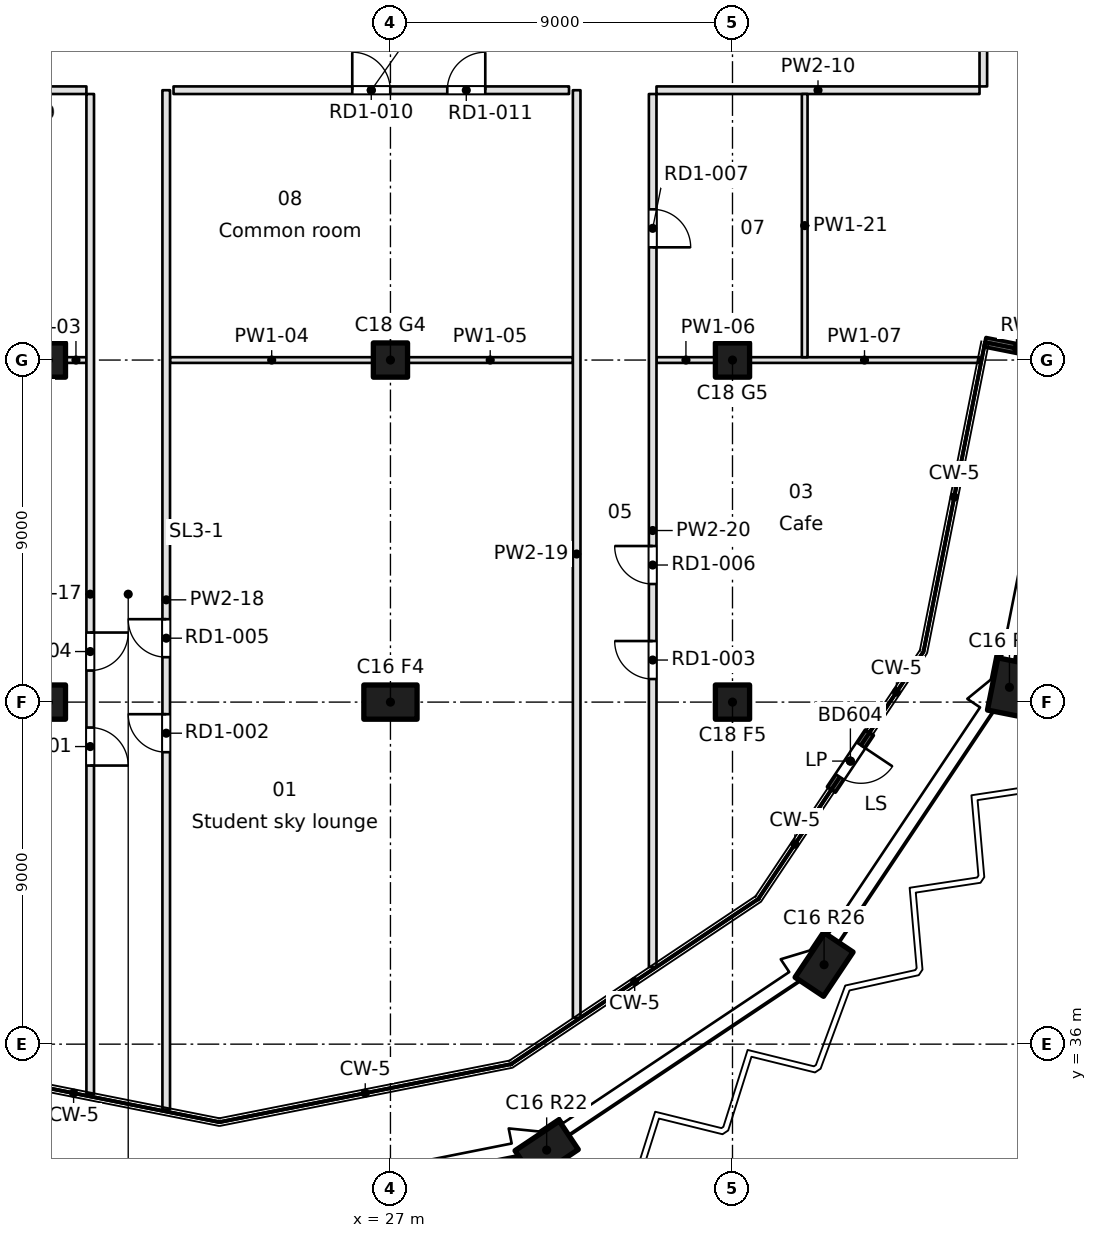
"""IFC4 building model, lengths in metres.
Left out: names, types, materials, properties, quantities, classifications, styles, units other than length and angle.
Written with IfcOpenShell. Run it as: python <this file> out.ifc"""

import sys

from ifc_helpers import new_model, si_unit, direction, frame, frame_2d, origin, origin_2d, place, context, subcontext, project, spatial, rectangle, extrude, element, fill, save


model = new_model("IFC4")
c1 = context("Model", 3, precision=1e-05, world=origin(), true_north=direction((0.0, 1.0)))
c2 = subcontext(c1, "Body", "Model", "MODEL_VIEW")
j1 = project(units=[si_unit("LENGTHUNIT", "METRE"), si_unit("PLANEANGLEUNIT", "RADIAN")], contexts=[c1])
p1 = place(None, origin())
s1 = spatial("IfcSite", under=j1, at=p1, CompositionType="ELEMENT")
p2 = place(p1, origin())
s2 = spatial("IfcBuilding", under=s1, at=p2, CompositionType="ELEMENT")
p3 = place(p2, frame((0.0, 0.0, 291.9)))
s3 = spatial("IfcBuildingStorey", under=s2, at=p3, CompositionType="ELEMENT", Elevation=291.9)
for number, where, z_axis, x_axis in (
    (1, (31.11, 33.213, 0.0), (0.0, 0.0, 1.0), (0.831, 0.556, 0.0)),
    (2, (38.41, 38.09, 0.0), (0.0, 0.0, 1.0), (0.556, 0.831, 0.0)),
    (3, (43.287, 45.39, 0.0), (0.0, 0.0, 1.0), (0.195, 0.981, 0.0)),
):
    element("IfcColumn", number, at=place(p3, frame(where, z_axis=z_axis, x_axis=x_axis)), inside=s3, PredefinedType="COLUMN", context=c2, shape_type="SweptSolid", body=[
        extrude(rectangle(XDim=1.4, YDim=0.9, at=origin_2d()), origin(), (0.0, 0.0, 1.0), 3.7),
    ])
for number, where, z_axis, x_axis in (
    (4, (18.0, 45.0, 0.0), (0.0, 0.0, 1.0), (1.0, 0.0, 0.0)),
    (5, (18.0, 54.0, 0.0), (0.0, 0.0, 1.0), (1.0, 0.0, 0.0)),
):
    element("IfcColumn", number, at=place(p3, frame(where, z_axis=z_axis, x_axis=x_axis)), inside=s3, PredefinedType="COLUMN", context=c2, shape_type="SweptSolid", body=[
        extrude(rectangle(XDim=0.9, YDim=0.9, at=origin_2d()), origin(), (0.0, 0.0, 1.0), 3.7),
    ])
p4 = place(p3, frame((27.0, 45.0, 0.0), z_axis=(0.0, 0.0, 1.0), x_axis=(1.0, 0.0, 0.0)))
e6 = element("IfcColumn", 6, at=p4, inside=s3, PredefinedType="COLUMN", context=c2, shape_type="SweptSolid", body=[
    extrude(rectangle(XDim=1.4, YDim=0.9, at=origin_2d()), origin(), (0.0, 0.0, 1.0), 3.7),
])
for number, where, z_axis, x_axis in (
    (7, (27.0, 54.0, 0.0), (0.0, 0.0, 1.0), (1.0, 0.0, 0.0)),
    (8, (36.0, 45.0, 0.0), (0.0, 0.0, 1.0), (1.0, 0.0, 0.0)),
    (9, (36.0, 54.0, 0.0), (0.0, 0.0, 1.0), (1.0, 0.0, 0.0)),
):
    element("IfcColumn", number, at=place(p3, frame(where, z_axis=z_axis, x_axis=x_axis)), inside=s3, PredefinedType="COLUMN", context=c2, shape_type="SweptSolid", body=[
        extrude(rectangle(XDim=0.9, YDim=0.9, at=origin_2d()), origin(), (0.0, 0.0, 1.0), 3.7),
    ])
p5 = place(p3, frame((38.602, 42.7, 0.0), z_axis=(0.0, 0.0, 1.0), x_axis=(0.555576323502, 0.83146554274, 0.0)))
e10 = element("IfcWall", 10, at=p5, inside=s3, PredefinedType="SOLIDWALL", context=c2, shape_type="SweptSolid", body=[
    extrude(rectangle(XDim=1.8, YDim=0.25, at=frame_2d((0.9, 0.0))), origin(), (0.0, 0.0, 1.0), 3.3),
])
p6 = place(p5, frame((0.4, 0.0, 0.0)))
e11 = element("IfcOpeningElement", 11, at=p6, cuts=e10, PredefinedType="OPENING", context=c2, shape_type="SweptSolid", body=[
    extrude(rectangle(XDim=1.0, YDim=2.1, at=frame_2d((0.5, 1.05))), frame((0.0, 0.125, 0.0), z_axis=(0.0, -1.0, 0.0), x_axis=(1.0, 0.0, 0.0)), (0.0, 0.0, 1.0), 0.25),
])
p7 = place(p3, frame((42.645, 54.469, 0.0), z_axis=(0.0, 0.0, 1.0), x_axis=(0.980846923473, -0.194780165092, 0.0)))
e12 = element("IfcWall", 12, at=p7, inside=s3, PredefinedType="SOLIDWALL", context=c2, shape_type="SweptSolid", body=[
    extrude(rectangle(XDim=1.687, YDim=0.25, at=frame_2d((0.844, 0.0))), origin(), (0.0, 0.0, 1.0), 3.3),
])
p8 = place(p3, frame((18.45, 54.0, 0.0), z_axis=(0.0, 0.0, 1.0), x_axis=(1.0, 0.0, 0.0)))
e13 = element("IfcWall", 13, at=p8, inside=s3, PredefinedType="PARTITIONING", context=c2, shape_type="SweptSolid", body=[
    extrude(rectangle(XDim=0.55, YDim=0.15, at=frame_2d((0.275, 0.0))), origin(), (0.0, 0.0, 1.0), 3.3),
])
p9 = place(p3, frame((21.2, 54.0, 0.0), z_axis=(0.0, 0.0, 1.0), x_axis=(1.0, 0.0, 0.0)))
e14 = element("IfcWall", 14, at=p9, inside=s3, PredefinedType="PARTITIONING", context=c2, shape_type="SweptSolid", body=[
    extrude(rectangle(XDim=5.35, YDim=0.15, at=frame_2d((2.675, 0.0))), origin(), (0.0, 0.0, 1.0), 3.3),
])
p10 = place(p3, frame((27.45, 54.0, 0.0), z_axis=(0.0, 0.0, 1.0), x_axis=(1.0, 0.0, 0.0)))
e15 = element("IfcWall", 15, at=p10, inside=s3, PredefinedType="PARTITIONING", context=c2, shape_type="SweptSolid", body=[
    extrude(rectangle(XDim=4.35, YDim=0.15, at=frame_2d((2.175, 0.0))), origin(), (0.0, 0.0, 1.0), 3.3),
])
p11 = place(p3, frame((34.0, 54.0, 0.0), z_axis=(0.0, 0.0, 1.0), x_axis=(1.0, 0.0, 0.0)))
e16 = element("IfcWall", 16, at=p11, inside=s3, PredefinedType="PARTITIONING", context=c2, shape_type="SweptSolid", body=[
    extrude(rectangle(XDim=1.55, YDim=0.15, at=frame_2d((0.775, 0.0))), origin(), (0.0, 0.0, 1.0), 3.3),
])
p12 = place(p3, frame((36.45, 54.0, 0.0), z_axis=(0.0, 0.0, 1.0), x_axis=(1.0, 0.0, 0.0)))
e17 = element("IfcWall", 17, at=p12, inside=s3, PredefinedType="PARTITIONING", context=c2, shape_type="SweptSolid", body=[
    extrude(rectangle(XDim=6.047, YDim=0.15, at=frame_2d((3.023, 0.0))), origin(), (0.0, 0.0, 1.0), 3.3),
])
p13 = place(p3, frame((19.0, 61.1, 0.0), z_axis=(0.0, 0.0, 1.0), x_axis=(-1.0, 0.0, 0.0)))
e18 = element("IfcWall", 18, at=p13, inside=s3, PredefinedType="PARTITIONING", context=c2, shape_type="SweptSolid", body=[
    extrude(rectangle(XDim=10.096, YDim=0.2, at=frame_2d((5.048, 0.0))), origin(), (0.0, 0.0, 1.0), 3.3),
])
p14 = place(p13, frame((4.548, 0.0, 0.0)))
e19 = element("IfcOpeningElement", 19, at=p14, cuts=e18, PredefinedType="OPENING", context=c2, shape_type="SweptSolid", body=[
    extrude(rectangle(XDim=1.0, YDim=2.1, at=frame_2d((0.5, 1.05))), frame((0.0, 0.1, 0.0), z_axis=(0.0, -1.0, 0.0), x_axis=(1.0, 0.0, 0.0)), (0.0, 0.0, 1.0), 0.2),
])
p15 = place(p13, frame((2.048, 0.0, 0.0)))
e20 = element("IfcOpeningElement", 20, at=p15, cuts=e18, PredefinedType="OPENING", context=c2, shape_type="SweptSolid", body=[
    extrude(rectangle(XDim=1.0, YDim=2.1, at=frame_2d((0.5, 1.05))), frame((0.0, 0.1, 0.0), z_axis=(0.0, -1.0, 0.0), x_axis=(1.0, 0.0, 0.0)), (0.0, 0.0, 1.0), 0.2),
])
p16 = place(p3, frame((31.698, 61.1, 0.0), z_axis=(0.0, 0.0, 1.0), x_axis=(-1.0, 0.0, 0.0)))
e21 = element("IfcWall", 21, at=p16, inside=s3, PredefinedType="PARTITIONING", context=c2, shape_type="SweptSolid", body=[
    extrude(rectangle(XDim=10.406, YDim=0.2, at=frame_2d((5.203, 0.0))), origin(), (0.0, 0.0, 1.0), 3.3),
])
p17 = place(p16, frame((4.703, 0.0, 0.0)))
e22 = element("IfcOpeningElement", 22, at=p17, cuts=e21, PredefinedType="OPENING", context=c2, shape_type="SweptSolid", body=[
    extrude(rectangle(XDim=1.0, YDim=2.1, at=frame_2d((0.5, 1.05))), frame((0.0, 0.1, 0.0), z_axis=(0.0, -1.0, 0.0), x_axis=(1.0, 0.0, 0.0)), (0.0, 0.0, 1.0), 0.2),
])
p18 = place(p16, frame((2.203, 0.0, 0.0)))
e23 = element("IfcOpeningElement", 23, at=p18, cuts=e21, PredefinedType="OPENING", context=c2, shape_type="SweptSolid", body=[
    extrude(rectangle(XDim=1.0, YDim=2.1, at=frame_2d((0.5, 1.05))), frame((0.0, 0.1, 0.0), z_axis=(0.0, -1.0, 0.0), x_axis=(1.0, 0.0, 0.0)), (0.0, 0.0, 1.0), 0.2),
])
p19 = place(p3, frame((42.5, 61.1, 0.0), z_axis=(0.0, 0.0, 1.0), x_axis=(-1.0, 0.0, 0.0)))
e24 = element("IfcWall", 24, at=p19, inside=s3, PredefinedType="PARTITIONING", context=c2, shape_type="SweptSolid", body=[
    extrude(rectangle(XDim=8.5, YDim=0.2, at=frame_2d((4.25, 0.0))), origin(), (0.0, 0.0, 1.0), 3.3),
])
p20 = place(p3, frame((19.1, 34.679, 0.0), z_axis=(0.0, 0.0, 1.0), x_axis=(0.0, 1.0, 0.0)))
e25 = element("IfcWall", 25, at=p20, inside=s3, PredefinedType="PARTITIONING", context=c2, shape_type="SweptSolid", body=[
    extrude(rectangle(XDim=26.321, YDim=0.2, at=frame_2d((13.16, 0.0))), origin(), (0.0, 0.0, 1.0), 3.3),
])
p21 = place(p20, frame((8.651, 0.0, 0.0)))
e26 = element("IfcOpeningElement", 26, at=p21, cuts=e25, PredefinedType="OPENING", context=c2, shape_type="SweptSolid", body=[
    extrude(rectangle(XDim=1.0, YDim=2.1, at=frame_2d((0.5, 1.05))), frame((0.0, 0.1, 0.0), z_axis=(0.0, -1.0, 0.0), x_axis=(1.0, 0.0, 0.0)), (0.0, 0.0, 1.0), 0.2),
])
p22 = place(p20, frame((11.151, 0.0, 0.0)))
e27 = element("IfcOpeningElement", 27, at=p22, cuts=e25, PredefinedType="OPENING", context=c2, shape_type="SweptSolid", body=[
    extrude(rectangle(XDim=1.0, YDim=2.1, at=frame_2d((0.5, 1.05))), frame((0.0, 0.1, 0.0), z_axis=(0.0, -1.0, 0.0), x_axis=(1.0, 0.0, 0.0)), (0.0, 0.0, 1.0), 0.2),
])
p23 = place(p3, frame((21.1, 61.1, 0.0), z_axis=(0.0, 0.0, 1.0), x_axis=(0.0, -1.0, 0.0)))
e28 = element("IfcWall", 28, at=p23, inside=s3, PredefinedType="PARTITIONING", context=c2, shape_type="SweptSolid", body=[
    extrude(rectangle(XDim=26.819, YDim=0.2, at=frame_2d((13.409, 0.0))), origin(), (0.0, 0.0, 1.0), 3.3),
])
p24 = place(p23, frame((16.418, 0.0, 0.0)))
e29 = element("IfcOpeningElement", 29, at=p24, cuts=e28, PredefinedType="OPENING", context=c2, shape_type="SweptSolid", body=[
    extrude(rectangle(XDim=1.0, YDim=2.1, at=frame_2d((0.5, 1.05))), frame((0.0, 0.1, 0.0), z_axis=(0.0, -1.0, 0.0), x_axis=(1.0, 0.0, 0.0)), (0.0, 0.0, 1.0), 0.2),
])
p25 = place(p23, frame((13.918, 0.0, 0.0)))
e30 = element("IfcOpeningElement", 30, at=p25, cuts=e28, PredefinedType="OPENING", context=c2, shape_type="SweptSolid", body=[
    extrude(rectangle(XDim=1.0, YDim=2.1, at=frame_2d((0.5, 1.05))), frame((0.0, 0.1, 0.0), z_axis=(0.0, -1.0, 0.0), x_axis=(1.0, 0.0, 0.0)), (0.0, 0.0, 1.0), 0.2),
])
p26 = place(p3, frame((31.9, 36.693, 0.0), z_axis=(0.0, 0.0, 1.0), x_axis=(0.0, 1.0, 0.0)))
e31 = element("IfcWall", 31, at=p26, inside=s3, PredefinedType="PARTITIONING", context=c2, shape_type="SweptSolid", body=[
    extrude(rectangle(XDim=24.407, YDim=0.2, at=frame_2d((12.204, 0.0))), origin(), (0.0, 0.0, 1.0), 3.3),
])
p27 = place(p3, frame((33.9, 61.0, 0.0), z_axis=(0.0, 0.0, 1.0), x_axis=(0.0, -1.0, 0.0)))
e32 = element("IfcWall", 32, at=p27, inside=s3, PredefinedType="PARTITIONING", context=c2, shape_type="SweptSolid", body=[
    extrude(rectangle(XDim=22.971, YDim=0.2, at=frame_2d((11.485, 0.0))), origin(), (0.0, 0.0, 1.0), 3.3),
])
p28 = place(p27, frame((14.393, 0.0, 0.0)))
e33 = element("IfcOpeningElement", 33, at=p28, cuts=e32, PredefinedType="OPENING", context=c2, shape_type="SweptSolid", body=[
    extrude(rectangle(XDim=1.0, YDim=2.1, at=frame_2d((0.5, 1.05))), frame((0.0, 0.1, 0.0), z_axis=(0.0, -1.0, 0.0), x_axis=(1.0, 0.0, 0.0)), (0.0, 0.0, 1.0), 0.2),
])
p29 = place(p27, frame((11.893, 0.0, 0.0)))
e34 = element("IfcOpeningElement", 34, at=p29, cuts=e32, PredefinedType="OPENING", context=c2, shape_type="SweptSolid", body=[
    extrude(rectangle(XDim=1.0, YDim=2.1, at=frame_2d((0.5, 1.05))), frame((0.0, 0.1, 0.0), z_axis=(0.0, -1.0, 0.0), x_axis=(1.0, 0.0, 0.0)), (0.0, 0.0, 1.0), 0.2),
])
p30 = place(p27, frame((3.034, 0.0, 0.0)))
e35 = element("IfcOpeningElement", 35, at=p30, cuts=e32, PredefinedType="OPENING", context=c2, shape_type="SweptSolid", body=[
    extrude(rectangle(XDim=1.0, YDim=2.1, at=frame_2d((0.5, 1.05))), frame((0.0, 0.1, 0.0), z_axis=(0.0, -1.0, 0.0), x_axis=(1.0, 0.0, 0.0)), (0.0, 0.0, 1.0), 0.2),
])
p31 = place(p3, frame((37.9, 61.0, 0.0), z_axis=(0.0, 0.0, 1.0), x_axis=(0.0, -1.0, 0.0)))
e36 = element("IfcWall", 36, at=p31, inside=s3, PredefinedType="PARTITIONING", context=c2, shape_type="SweptSolid", body=[
    extrude(rectangle(XDim=6.925, YDim=0.15, at=frame_2d((3.462, 0.0))), origin(), (0.0, 0.0, 1.0), 3.3),
])
p32 = place(p3, frame((42.6, 63.6, 0.0), z_axis=(0.0, 0.0, 1.0), x_axis=(0.0, -1.0, 0.0)))
e37 = element("IfcWall", 37, at=p32, inside=s3, PredefinedType="PARTITIONING", context=c2, shape_type="SweptSolid", body=[
    extrude(rectangle(XDim=2.4, YDim=0.2, at=frame_2d((1.2, 0.0))), origin(), (0.0, 0.0, 1.0), 3.3),
])
p33 = place(p6, frame((1.0, 0.0, 0.0), z_axis=(0.0, 0.0, 1.0), x_axis=(-1.0, 0.0, 0.0)))
e38 = element("IfcDoor", 38, at=p33, inside=s3, OperationType="SINGLE_SWING_LEFT", PredefinedType="DOOR", context=c2, shape_type="SweptSolid", body=[
    extrude(rectangle(XDim=1.0, YDim=2.1, at=frame_2d((0.5, 1.05))), frame((0.0, 0.025, 0.0), z_axis=(0.0, -1.0, 0.0), x_axis=(1.0, 0.0, 0.0)), (0.0, 0.0, 1.0), 0.05),
])
fill(e11, e38)
p34 = place(p21, frame((1.0, 0.0, 0.0), z_axis=(0.0, 0.0, 1.0), x_axis=(-1.0, 0.0, 0.0)))
e39 = element("IfcDoor", 39, at=p34, inside=s3, OperationType="SINGLE_SWING_RIGHT", PredefinedType="DOOR", context=c2, shape_type="SweptSolid", body=[
    extrude(rectangle(XDim=1.0, YDim=2.1, at=frame_2d((0.5, 1.05))), frame((0.0, 0.025, 0.0), z_axis=(0.0, -1.0, 0.0), x_axis=(1.0, 0.0, 0.0)), (0.0, 0.0, 1.0), 0.05),
])
fill(e26, e39)
p35 = place(p24, frame((1.0, 0.0, 0.0), z_axis=(0.0, 0.0, 1.0), x_axis=(-1.0, 0.0, 0.0)))
e40 = element("IfcDoor", 40, at=p35, inside=s3, OperationType="SINGLE_SWING_RIGHT", PredefinedType="DOOR", context=c2, shape_type="SweptSolid", body=[
    extrude(rectangle(XDim=1.0, YDim=2.1, at=frame_2d((0.5, 1.05))), frame((0.0, 0.025, 0.0), z_axis=(0.0, -1.0, 0.0), x_axis=(1.0, 0.0, 0.0)), (0.0, 0.0, 1.0), 0.05),
])
fill(e29, e40)
p36 = place(p28, frame((1.0, 0.0, 0.0), z_axis=(0.0, 0.0, 1.0), x_axis=(-1.0, 0.0, 0.0)))
e41 = element("IfcDoor", 41, at=p36, inside=s3, OperationType="SINGLE_SWING_RIGHT", PredefinedType="DOOR", context=c2, shape_type="SweptSolid", body=[
    extrude(rectangle(XDim=1.0, YDim=2.1, at=frame_2d((0.5, 1.05))), frame((0.0, 0.025, 0.0), z_axis=(0.0, -1.0, 0.0), x_axis=(1.0, 0.0, 0.0)), (0.0, 0.0, 1.0), 0.05),
])
fill(e33, e41)
p37 = place(p22, frame((1.0, 0.0, 0.0), z_axis=(0.0, 0.0, 1.0), x_axis=(-1.0, 0.0, 0.0)))
e42 = element("IfcDoor", 42, at=p37, inside=s3, OperationType="SINGLE_SWING_LEFT", PredefinedType="DOOR", context=c2, shape_type="SweptSolid", body=[
    extrude(rectangle(XDim=1.0, YDim=2.1, at=frame_2d((0.5, 1.05))), frame((0.0, 0.025, 0.0), z_axis=(0.0, -1.0, 0.0), x_axis=(1.0, 0.0, 0.0)), (0.0, 0.0, 1.0), 0.05),
])
fill(e27, e42)
p38 = place(p25, frame((1.0, 0.0, 0.0), z_axis=(0.0, 0.0, 1.0), x_axis=(-1.0, 0.0, 0.0)))
e43 = element("IfcDoor", 43, at=p38, inside=s3, OperationType="SINGLE_SWING_RIGHT", PredefinedType="DOOR", context=c2, shape_type="SweptSolid", body=[
    extrude(rectangle(XDim=1.0, YDim=2.1, at=frame_2d((0.5, 1.05))), frame((0.0, 0.025, 0.0), z_axis=(0.0, -1.0, 0.0), x_axis=(1.0, 0.0, 0.0)), (0.0, 0.0, 1.0), 0.05),
])
fill(e30, e43)
p39 = place(p29, frame((1.0, 0.0, 0.0), z_axis=(0.0, 0.0, 1.0), x_axis=(-1.0, 0.0, 0.0)))
e44 = element("IfcDoor", 44, at=p39, inside=s3, OperationType="SINGLE_SWING_RIGHT", PredefinedType="DOOR", context=c2, shape_type="SweptSolid", body=[
    extrude(rectangle(XDim=1.0, YDim=2.1, at=frame_2d((0.5, 1.05))), frame((0.0, 0.025, 0.0), z_axis=(0.0, -1.0, 0.0), x_axis=(1.0, 0.0, 0.0)), (0.0, 0.0, 1.0), 0.05),
])
fill(e34, e44)
p40 = place(p30, origin())
e45 = element("IfcDoor", 45, at=p40, inside=s3, OperationType="SINGLE_SWING_RIGHT", PredefinedType="DOOR", context=c2, shape_type="SweptSolid", body=[
    extrude(rectangle(XDim=1.0, YDim=2.1, at=frame_2d((0.5, 1.05))), frame((0.0, 0.025, 0.0), z_axis=(0.0, -1.0, 0.0), x_axis=(1.0, 0.0, 0.0)), (0.0, 0.0, 1.0), 0.05),
])
fill(e35, e45)
p41 = place(p17, frame((1.0, 0.0, 0.0), z_axis=(0.0, 0.0, 1.0), x_axis=(-1.0, 0.0, 0.0)))
e46 = element("IfcDoor", 46, at=p41, inside=s3, OperationType="SINGLE_SWING_LEFT", PredefinedType="DOOR", context=c2, shape_type="SweptSolid", body=[
    extrude(rectangle(XDim=1.0, YDim=2.1, at=frame_2d((0.5, 1.05))), frame((0.0, 0.025, 0.0), z_axis=(0.0, -1.0, 0.0), x_axis=(1.0, 0.0, 0.0)), (0.0, 0.0, 1.0), 0.05),
])
fill(e22, e46)
p42 = place(p18, frame((1.0, 0.0, 0.0), z_axis=(0.0, 0.0, 1.0), x_axis=(-1.0, 0.0, 0.0)))
e47 = element("IfcDoor", 47, at=p42, inside=s3, OperationType="SINGLE_SWING_RIGHT", PredefinedType="DOOR", context=c2, shape_type="SweptSolid", body=[
    extrude(rectangle(XDim=1.0, YDim=2.1, at=frame_2d((0.5, 1.05))), frame((0.0, 0.025, 0.0), z_axis=(0.0, -1.0, 0.0), x_axis=(1.0, 0.0, 0.0)), (0.0, 0.0, 1.0), 0.05),
])
fill(e23, e47)
save(model, sys.argv[1])
